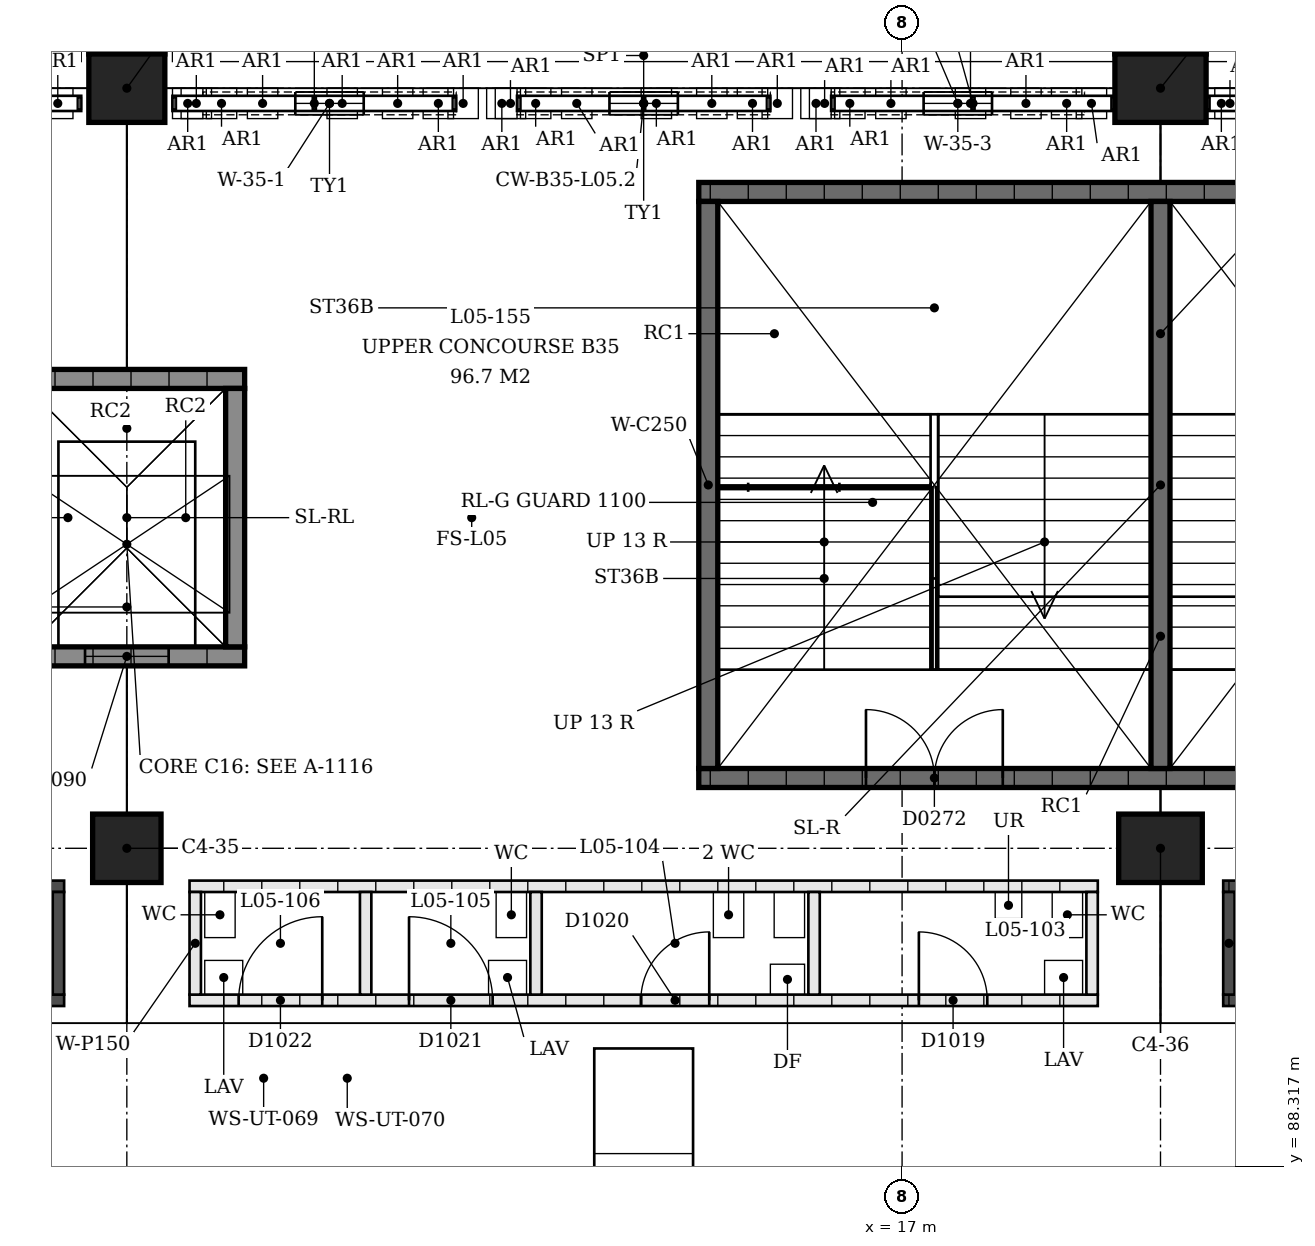
"""IFC4 building model, lengths in metres.
Left out: names, types, materials, properties, quantities, classifications, styles, units other than length and angle.
Written with IfcOpenShell. Run it as: python <this file> out.ifc"""

import sys

from ifc_helpers import new_model, si_unit, direction, frame, frame_2d, origin, origin_2d, place, context, subcontext, project, spatial, polyline, rectangle, outline, extrude, element, fill, save


model = new_model("IFC4")
c1 = context("Model", 3, precision=1e-05, world=origin(), true_north=direction((0.0, 1.0)))
c2 = subcontext(c1, "Body", "Model", "MODEL_VIEW")
j1 = project(units=[si_unit("LENGTHUNIT", "METRE"), si_unit("PLANEANGLEUNIT", "RADIAN")], contexts=[c1])
p1 = place(None, origin())
s1 = spatial("IfcSite", under=j1, at=p1, CompositionType="ELEMENT")
p2 = place(p1, origin())
s2 = spatial("IfcBuilding", under=s1, at=p2, CompositionType="ELEMENT")
p3 = place(p2, frame((0.0, 0.0, 22.5)))
s3 = spatial("IfcBuildingStorey", under=s2, at=p3, CompositionType="ELEMENT", Elevation=22.5)
p4 = place(p3, frame((6.8, 92.5, 0.0), z_axis=(0.0, 0.0, 1.0), x_axis=(-1.0, 0.0, 0.0)))
e1 = element("IfcColumn", 1, at=p4, inside=s3, PredefinedType="COLUMN", context=c2, shape_type="SweptSolid", body=[
    extrude(rectangle(XDim=0.9, YDim=0.9, at=origin_2d()), origin(), (0.0, 0.0, 1.0), 6.5),
])
p5 = place(p3, frame((6.8, 102.5, 0.0), z_axis=(0.0, 0.0, 1.0), x_axis=(-1.0, 0.0, 0.0)))
e2 = element("IfcColumn", 2, at=p5, inside=s3, PredefinedType="COLUMN", context=c2, shape_type="SweptSolid", body=[
    extrude(rectangle(XDim=1.0, YDim=0.9, at=origin_2d()), origin(), (0.0, 0.0, 1.0), 6.5),
])
p6 = place(p3, frame((20.4, 92.5, 0.0), z_axis=(0.0, 0.0, 1.0), x_axis=(-1.0, 0.0, 0.0)))
e3 = element("IfcColumn", 3, at=p6, inside=s3, PredefinedType="COLUMN", context=c2, shape_type="SweptSolid", body=[
    extrude(rectangle(XDim=1.1, YDim=0.9, at=origin_2d()), origin(), (0.0, 0.0, 1.0), 6.5),
])
p7 = place(p3, frame((20.4, 102.5, 0.0), z_axis=(0.0, 0.0, 1.0), x_axis=(-1.0, 0.0, 0.0)))
e4 = element("IfcColumn", 4, at=p7, inside=s3, PredefinedType="COLUMN", context=c2, shape_type="SweptSolid", body=[
    extrude(rectangle(XDim=1.2, YDim=0.9, at=origin_2d()), origin(), (0.0, 0.0, 1.0), 6.5),
])
p8 = place(p3, frame((7.8, 102.3, 4.1), z_axis=(0.0, 0.0, 1.0), x_axis=(1.0, 0.0, 0.0)))
e5 = element("IfcWall", 5, at=p8, inside=s3, PredefinedType="SOLIDWALL", context=c2, shape_type="SweptSolid", body=[
    extrude(outline(polyline([(0.0, 0.0), (3.333, 0.0), (3.333, 0.05), (3.225, 1.288), (2.905, 2.541), (2.38, 3.722), (1.667, 4.8), (0.953, 3.722), (0.428, 2.541), (0.108, 1.288), (0.0, 0.05), (0.0, 0.0)])), frame((0.0, 0.15, 0.0), z_axis=(0.0, -1.0, 0.0), x_axis=(1.0, 0.0, 0.0)), (0.0, 0.0, 1.0), 0.3),
])
p9 = place(p8, frame((1.217, 0.0, 0.4)))
e6 = element("IfcOpeningElement", 6, at=p9, cuts=e5, PredefinedType="OPENING", context=c2, shape_type="SweptSolid", body=[
    extrude(rectangle(XDim=0.9, YDim=3.6, at=frame_2d((0.45, 1.8))), frame((0.0, 0.16, 0.0), z_axis=(0.0, -1.0, 0.0), x_axis=(1.0, 0.0, 0.0)), (0.0, 0.0, 1.0), 0.32),
])
p10 = place(p3, frame((11.933, 102.3, 4.1), z_axis=(0.0, 0.0, 1.0), x_axis=(1.0, 0.0, 0.0)))
e7 = element("IfcWall", 7, at=p10, inside=s3, PredefinedType="SOLIDWALL", context=c2, shape_type="SweptSolid", body=[
    extrude(outline(polyline([(0.0, 0.0), (3.333, 0.0), (3.333, 0.05), (3.225, 1.288), (2.905, 2.541), (2.38, 3.722), (1.667, 4.8), (0.953, 3.722), (0.428, 2.541), (0.108, 1.288), (0.0, 0.05), (0.0, 0.0)])), frame((0.0, 0.15, 0.0), z_axis=(0.0, -1.0, 0.0), x_axis=(1.0, 0.0, 0.0)), (0.0, 0.0, 1.0), 0.3),
])
p11 = place(p10, frame((1.217, 0.0, 0.4)))
e8 = element("IfcOpeningElement", 8, at=p11, cuts=e7, PredefinedType="OPENING", context=c2, shape_type="SweptSolid", body=[
    extrude(rectangle(XDim=0.9, YDim=3.6, at=frame_2d((0.45, 1.8))), frame((0.0, 0.16, 0.0), z_axis=(0.0, -1.0, 0.0), x_axis=(1.0, 0.0, 0.0)), (0.0, 0.0, 1.0), 0.32),
])
p12 = place(p3, frame((16.067, 102.3, 4.1), z_axis=(0.0, 0.0, 1.0), x_axis=(1.0, 0.0, 0.0)))
e9 = element("IfcWall", 9, at=p12, inside=s3, PredefinedType="SOLIDWALL", context=c2, shape_type="SweptSolid", body=[
    extrude(outline(polyline([(0.0, 0.0), (3.333, 0.0), (3.333, 0.05), (3.225, 1.288), (2.905, 2.541), (2.38, 3.722), (1.667, 4.8), (0.953, 3.722), (0.428, 2.541), (0.108, 1.288), (0.0, 0.05), (0.0, 0.0)])), frame((0.0, 0.15, 0.0), z_axis=(0.0, -1.0, 0.0), x_axis=(1.0, 0.0, 0.0)), (0.0, 0.0, 1.0), 0.3),
])
p13 = place(p12, frame((1.217, 0.0, 0.4)))
e10 = element("IfcOpeningElement", 10, at=p13, cuts=e9, PredefinedType="OPENING", context=c2, shape_type="SweptSolid", body=[
    extrude(rectangle(XDim=0.9, YDim=3.6, at=frame_2d((0.45, 1.8))), frame((0.0, 0.16, 0.0), z_axis=(0.0, -1.0, 0.0), x_axis=(1.0, 0.0, 0.0)), (0.0, 0.0, 1.0), 0.32),
])
p14 = place(p3, frame((26.475, 93.425, 0.0), z_axis=(0.0, 0.0, 1.0), x_axis=(-1.0, 0.0, 0.0)))
e11 = element("IfcWall", 11, at=p14, inside=s3, PredefinedType="SHEAR", context=c2, shape_type="SweptSolid", body=[
    extrude(rectangle(XDim=12.15, YDim=0.25, at=frame_2d((6.075, 0.0))), origin(), (0.0, 0.0, 1.0), 2.1),
])
p15 = place(p14, frame((2.2, 0.0, 0.0)))
e12 = element("IfcOpeningElement", 12, at=p15, cuts=e11, PredefinedType="OPENING", context=c2, shape_type="SweptSolid", body=[
    extrude(rectangle(XDim=1.8, YDim=2.1, at=frame_2d((0.9, 1.05))), frame((0.0, 0.125, 0.0), z_axis=(0.0, -1.0, 0.0), x_axis=(1.0, 0.0, 0.0)), (0.0, 0.0, 1.0), 0.25),
])
p16 = place(p14, frame((8.15, 0.0, 0.0)))
e13 = element("IfcOpeningElement", 13, at=p16, cuts=e11, PredefinedType="OPENING", context=c2, shape_type="SweptSolid", body=[
    extrude(rectangle(XDim=1.8, YDim=2.1, at=frame_2d((0.9, 1.05))), frame((0.0, 0.125, 0.0), z_axis=(0.0, -1.0, 0.0), x_axis=(1.0, 0.0, 0.0)), (0.0, 0.0, 1.0), 0.25),
])
p17 = place(p3, frame((26.475, 101.135, 0.0), z_axis=(0.0, 0.0, 1.0), x_axis=(-1.0, 0.0, 0.0)))
e14 = element("IfcWall", 14, at=p17, inside=s3, PredefinedType="SHEAR", context=c2, shape_type="SweptSolid", body=[
    extrude(rectangle(XDim=12.15, YDim=0.25, at=frame_2d((6.075, 0.0))), origin(), (0.0, 0.0, 1.0), 2.1),
])
for number, where, z_axis, x_axis in (
    (15, (14.45, 93.55, 0.0), (0.0, 0.0, 1.0), (0.0, 1.0, 0.0)),
    (16, (20.4, 93.55, 0.0), (0.0, 0.0, 1.0), (0.0, 1.0, 0.0)),
):
    element("IfcWall", number, at=place(p3, frame(where, z_axis=z_axis, x_axis=x_axis)), inside=s3, PredefinedType="SHEAR", context=c2, shape_type="SweptSolid", body=[
        extrude(rectangle(XDim=7.46, YDim=0.25, at=frame_2d((3.73, 0.0))), origin(), (0.0, 0.0, 1.0), 2.1),
    ])
p18 = place(p3, frame((8.35, 95.025, 0.0), z_axis=(0.0, 0.0, 1.0), x_axis=(-1.0, 0.0, 0.0)))
e17 = element("IfcWall", 17, at=p18, inside=s3, PredefinedType="SHEAR", context=c2, shape_type="SweptSolid", body=[
    extrude(rectangle(XDim=3.1, YDim=0.25, at=frame_2d((1.55, 0.0))), origin(), (0.0, 0.0, 1.0), 3.4),
])
p19 = place(p18, frame((1.0, 0.0, 0.0)))
e18 = element("IfcOpeningElement", 18, at=p19, cuts=e17, PredefinedType="OPENING", context=c2, shape_type="SweptSolid", body=[
    extrude(rectangle(XDim=1.1, YDim=2.1, at=frame_2d((0.55, 1.05))), frame((0.0, 0.125, 0.0), z_axis=(0.0, -1.0, 0.0), x_axis=(1.0, 0.0, 0.0)), (0.0, 0.0, 1.0), 0.25),
])
p20 = place(p3, frame((8.35, 98.675, 0.0), z_axis=(0.0, 0.0, 1.0), x_axis=(-1.0, 0.0, 0.0)))
e19 = element("IfcWall", 19, at=p20, inside=s3, PredefinedType="SHEAR", context=c2, shape_type="SweptSolid", body=[
    extrude(rectangle(XDim=3.1, YDim=0.25, at=frame_2d((1.55, 0.0))), origin(), (0.0, 0.0, 1.0), 3.4),
])
p21 = place(p3, frame((8.225, 95.15, 0.0), z_axis=(0.0, 0.0, 1.0), x_axis=(0.0, 1.0, 0.0)))
e20 = element("IfcWall", 20, at=p21, inside=s3, PredefinedType="SHEAR", context=c2, shape_type="SweptSolid", body=[
    extrude(rectangle(XDim=3.4, YDim=0.25, at=frame_2d((1.7, 0.0))), origin(), (0.0, 0.0, 1.0), 3.4),
])
p22 = place(p3, frame((-5.975, 90.5, 0.0), z_axis=(0.0, 0.0, 1.0), x_axis=(1.0, 0.0, 0.0)))
e21 = element("IfcWall", 21, at=p22, inside=s3, PredefinedType="SOLIDWALL", context=c2, shape_type="SweptSolid", body=[
    extrude(rectangle(XDim=11.95, YDim=0.15, at=frame_2d((5.975, 0.0))), origin(), (0.0, 0.0, 1.0), 3.0),
])
p23 = place(p22, frame((2.525, 0.0, 0.0)))
e22 = element("IfcOpeningElement", 22, at=p23, cuts=e21, PredefinedType="OPENING", context=c2, shape_type="SweptSolid", body=[
    extrude(rectangle(XDim=1.0, YDim=2.1, at=frame_2d((0.5, 1.05))), frame((0.0, 0.075, 0.0), z_axis=(0.0, -1.0, 0.0), x_axis=(1.0, 0.0, 0.0)), (0.0, 0.0, 1.0), 0.15),
])
p24 = place(p22, frame((8.425, 0.0, 0.0)))
e23 = element("IfcOpeningElement", 23, at=p24, cuts=e21, PredefinedType="OPENING", context=c2, shape_type="SweptSolid", body=[
    extrude(rectangle(XDim=1.0, YDim=2.1, at=frame_2d((0.5, 1.05))), frame((0.0, 0.075, 0.0), z_axis=(0.0, -1.0, 0.0), x_axis=(1.0, 0.0, 0.0)), (0.0, 0.0, 1.0), 0.15),
])
p25 = place(p3, frame((-5.975, 92.0, 0.0), z_axis=(0.0, 0.0, 1.0), x_axis=(1.0, 0.0, 0.0)))
e24 = element("IfcWall", 24, at=p25, inside=s3, PredefinedType="SOLIDWALL", context=c2, shape_type="SweptSolid", body=[
    extrude(rectangle(XDim=11.95, YDim=0.15, at=frame_2d((5.975, 0.0))), origin(), (0.0, 0.0, 1.0), 3.0),
])
p26 = place(p3, frame((5.9, 90.575, 0.0), z_axis=(0.0, 0.0, 1.0), x_axis=(0.0, 1.0, 0.0)))
e25 = element("IfcWall", 25, at=p26, inside=s3, PredefinedType="SOLIDWALL", context=c2, shape_type="SweptSolid", body=[
    extrude(rectangle(XDim=1.35, YDim=0.15, at=frame_2d((0.675, 0.0))), origin(), (0.0, 0.0, 1.0), 3.0),
])
p27 = place(p3, frame((19.575, 90.5, 0.0), z_axis=(0.0, 0.0, 1.0), x_axis=(-1.0, 0.0, 0.0)))
e26 = element("IfcWall", 26, at=p27, inside=s3, PredefinedType="PARTITIONING", context=c2, shape_type="SweptSolid", body=[
    extrude(rectangle(XDim=11.95, YDim=0.15, at=frame_2d((5.975, 0.0))), origin(), (0.0, 0.0, 1.0), 3.0),
])
p28 = place(p27, frame((1.454, 0.0, 0.0)))
e27 = element("IfcOpeningElement", 27, at=p28, cuts=e26, PredefinedType="OPENING", context=c2, shape_type="SweptSolid", body=[
    extrude(rectangle(XDim=0.9, YDim=2.1, at=frame_2d((0.45, 1.05))), frame((0.0, 0.075, 0.0), z_axis=(0.0, -1.0, 0.0), x_axis=(1.0, 0.0, 0.0)), (0.0, 0.0, 1.0), 0.15),
])
p29 = place(p27, frame((5.112, 0.0, 0.0)))
e28 = element("IfcOpeningElement", 28, at=p29, cuts=e26, PredefinedType="OPENING", context=c2, shape_type="SweptSolid", body=[
    extrude(rectangle(XDim=0.9, YDim=2.1, at=frame_2d((0.45, 1.05))), frame((0.0, 0.075, 0.0), z_axis=(0.0, -1.0, 0.0), x_axis=(1.0, 0.0, 0.0)), (0.0, 0.0, 1.0), 0.15),
])
p30 = place(p27, frame((7.962, 0.0, 0.0)))
e29 = element("IfcOpeningElement", 29, at=p30, cuts=e26, PredefinedType="OPENING", context=c2, shape_type="SweptSolid", body=[
    extrude(rectangle(XDim=1.1, YDim=2.1, at=frame_2d((0.55, 1.05))), frame((0.0, 0.075, 0.0), z_axis=(0.0, -1.0, 0.0), x_axis=(1.0, 0.0, 0.0)), (0.0, 0.0, 1.0), 0.15),
])
p31 = place(p27, frame((10.204, 0.0, 0.0)))
e30 = element("IfcOpeningElement", 30, at=p31, cuts=e26, PredefinedType="OPENING", context=c2, shape_type="SweptSolid", body=[
    extrude(rectangle(XDim=1.1, YDim=2.1, at=frame_2d((0.55, 1.05))), frame((0.0, 0.075, 0.0), z_axis=(0.0, -1.0, 0.0), x_axis=(1.0, 0.0, 0.0)), (0.0, 0.0, 1.0), 0.15),
])
p32 = place(p3, frame((19.575, 92.0, 0.0), z_axis=(0.0, 0.0, 1.0), x_axis=(-1.0, 0.0, 0.0)))
e31 = element("IfcWall", 31, at=p32, inside=s3, PredefinedType="PARTITIONING", context=c2, shape_type="SweptSolid", body=[
    extrude(rectangle(XDim=11.95, YDim=0.15, at=frame_2d((5.975, 0.0))), origin(), (0.0, 0.0, 1.0), 3.0),
])
for number, where, z_axis, x_axis in (
    (32, (19.5, 90.575, 0.0), (0.0, 0.0, 1.0), (0.0, 1.0, 0.0)),
    (33, (15.842, 90.575, 0.0), (0.0, 0.0, 1.0), (0.0, 1.0, 0.0)),
    (34, (12.184, 90.575, 0.0), (0.0, 0.0, 1.0), (0.0, 1.0, 0.0)),
    (35, (9.942, 90.575, 0.0), (0.0, 0.0, 1.0), (0.0, 1.0, 0.0)),
    (36, (7.7, 90.575, 0.0), (0.0, 0.0, 1.0), (0.0, 1.0, 0.0)),
):
    element("IfcWall", number, at=place(p3, frame(where, z_axis=z_axis, x_axis=x_axis)), inside=s3, PredefinedType="PARTITIONING", context=c2, shape_type="SweptSolid", body=[
        extrude(rectangle(XDim=1.35, YDim=0.15, at=frame_2d((0.675, 0.0))), origin(), (0.0, 0.0, 1.0), 3.0),
    ])
p33 = place(p3, frame((21.225, 90.5, 0.0), z_axis=(0.0, 0.0, 1.0), x_axis=(1.0, 0.0, 0.0)))
e37 = element("IfcWall", 37, at=p33, inside=s3, PredefinedType="SOLIDWALL", context=c2, shape_type="SweptSolid", body=[
    extrude(rectangle(XDim=11.95, YDim=0.15, at=frame_2d((5.975, 0.0))), origin(), (0.0, 0.0, 1.0), 3.0),
])
p34 = place(p33, frame((2.525, 0.0, 0.0)))
e38 = element("IfcOpeningElement", 38, at=p34, cuts=e37, PredefinedType="OPENING", context=c2, shape_type="SweptSolid", body=[
    extrude(rectangle(XDim=1.0, YDim=2.1, at=frame_2d((0.5, 1.05))), frame((0.0, 0.075, 0.0), z_axis=(0.0, -1.0, 0.0), x_axis=(1.0, 0.0, 0.0)), (0.0, 0.0, 1.0), 0.15),
])
p35 = place(p33, frame((8.425, 0.0, 0.0)))
e39 = element("IfcOpeningElement", 39, at=p35, cuts=e37, PredefinedType="OPENING", context=c2, shape_type="SweptSolid", body=[
    extrude(rectangle(XDim=1.0, YDim=2.1, at=frame_2d((0.5, 1.05))), frame((0.0, 0.075, 0.0), z_axis=(0.0, -1.0, 0.0), x_axis=(1.0, 0.0, 0.0)), (0.0, 0.0, 1.0), 0.15),
])
p36 = place(p3, frame((21.225, 92.0, 0.0), z_axis=(0.0, 0.0, 1.0), x_axis=(1.0, 0.0, 0.0)))
e40 = element("IfcWall", 40, at=p36, inside=s3, PredefinedType="SOLIDWALL", context=c2, shape_type="SweptSolid", body=[
    extrude(rectangle(XDim=11.95, YDim=0.15, at=frame_2d((5.975, 0.0))), origin(), (0.0, 0.0, 1.0), 3.0),
])
p37 = place(p3, frame((21.3, 90.575, 0.0), z_axis=(0.0, 0.0, 1.0), x_axis=(0.0, 1.0, 0.0)))
e41 = element("IfcWall", 41, at=p37, inside=s3, PredefinedType="SOLIDWALL", context=c2, shape_type="SweptSolid", body=[
    extrude(rectangle(XDim=1.35, YDim=0.15, at=frame_2d((0.675, 0.0))), origin(), (0.0, 0.0, 1.0), 3.0),
])
p38 = place(p9, origin())
e42 = element("IfcWindow", 42, at=p38, inside=s3, PartitioningType="SINGLE_PANEL", PredefinedType="WINDOW", context=c2, shape_type="SweptSolid", body=[
    extrude(rectangle(XDim=0.9, YDim=3.6, at=frame_2d((0.45, 1.8))), frame((0.0, 0.03, 0.0), z_axis=(0.0, -1.0, 0.0), x_axis=(1.0, 0.0, 0.0)), (0.0, 0.0, 1.0), 0.06),
])
fill(e6, e42)
p39 = place(p11, origin())
e43 = element("IfcWindow", 43, at=p39, inside=s3, PartitioningType="SINGLE_PANEL", PredefinedType="WINDOW", context=c2, shape_type="SweptSolid", body=[
    extrude(rectangle(XDim=0.9, YDim=3.6, at=frame_2d((0.45, 1.8))), frame((0.0, 0.03, 0.0), z_axis=(0.0, -1.0, 0.0), x_axis=(1.0, 0.0, 0.0)), (0.0, 0.0, 1.0), 0.06),
])
fill(e8, e43)
p40 = place(p13, origin())
e44 = element("IfcWindow", 44, at=p40, inside=s3, PartitioningType="SINGLE_PANEL", PredefinedType="WINDOW", context=c2, shape_type="SweptSolid", body=[
    extrude(rectangle(XDim=0.9, YDim=3.6, at=frame_2d((0.45, 1.8))), frame((0.0, 0.03, 0.0), z_axis=(0.0, -1.0, 0.0), x_axis=(1.0, 0.0, 0.0)), (0.0, 0.0, 1.0), 0.06),
])
fill(e10, e44)
p41 = place(p16, origin())
e45 = element("IfcDoor", 45, at=p41, inside=s3, OperationType="DOUBLE_DOOR_SINGLE_SWING", PredefinedType="DOOR", context=c2, shape_type="SweptSolid", body=[
    extrude(rectangle(XDim=1.8, YDim=2.1, at=frame_2d((0.9, 1.05))), frame((0.0, 0.025, 0.0), z_axis=(0.0, -1.0, 0.0), x_axis=(1.0, 0.0, 0.0)), (0.0, 0.0, 1.0), 0.05),
])
fill(e13, e45)
p42 = place(p19, origin())
e46 = element("IfcDoor", 46, at=p42, inside=s3, OperationType="SLIDING_TO_LEFT", PredefinedType="DOOR", context=c2, shape_type="SweptSolid", body=[
    extrude(rectangle(XDim=1.1, YDim=2.1, at=frame_2d((0.55, 1.05))), frame((0.0, 0.025, 0.0), z_axis=(0.0, -1.0, 0.0), x_axis=(1.0, 0.0, 0.0)), (0.0, 0.0, 1.0), 0.05),
])
fill(e18, e46)
p43 = place(p28, origin())
e47 = element("IfcDoor", 47, at=p43, inside=s3, OperationType="SINGLE_SWING_RIGHT", PredefinedType="DOOR", context=c2, shape_type="SweptSolid", body=[
    extrude(rectangle(XDim=0.9, YDim=2.1, at=frame_2d((0.45, 1.05))), frame((0.0, 0.025, 0.0), z_axis=(0.0, -1.0, 0.0), x_axis=(1.0, 0.0, 0.0)), (0.0, 0.0, 1.0), 0.05),
])
fill(e27, e47)
p44 = place(p29, origin())
e48 = element("IfcDoor", 48, at=p44, inside=s3, OperationType="SINGLE_SWING_LEFT", PredefinedType="DOOR", context=c2, shape_type="SweptSolid", body=[
    extrude(rectangle(XDim=0.9, YDim=2.1, at=frame_2d((0.45, 1.05))), frame((0.0, 0.025, 0.0), z_axis=(0.0, -1.0, 0.0), x_axis=(1.0, 0.0, 0.0)), (0.0, 0.0, 1.0), 0.05),
])
fill(e28, e48)
p45 = place(p30, origin())
e49 = element("IfcDoor", 49, at=p45, inside=s3, OperationType="SINGLE_SWING_RIGHT", PredefinedType="DOOR", context=c2, shape_type="SweptSolid", body=[
    extrude(rectangle(XDim=1.1, YDim=2.1, at=frame_2d((0.55, 1.05))), frame((0.0, 0.025, 0.0), z_axis=(0.0, -1.0, 0.0), x_axis=(1.0, 0.0, 0.0)), (0.0, 0.0, 1.0), 0.05),
])
fill(e29, e49)
p46 = place(p31, origin())
e50 = element("IfcDoor", 50, at=p46, inside=s3, OperationType="SINGLE_SWING_LEFT", PredefinedType="DOOR", context=c2, shape_type="SweptSolid", body=[
    extrude(rectangle(XDim=1.1, YDim=2.1, at=frame_2d((0.55, 1.05))), frame((0.0, 0.025, 0.0), z_axis=(0.0, -1.0, 0.0), x_axis=(1.0, 0.0, 0.0)), (0.0, 0.0, 1.0), 0.05),
])
fill(e30, e50)
save(model, sys.argv[1])
